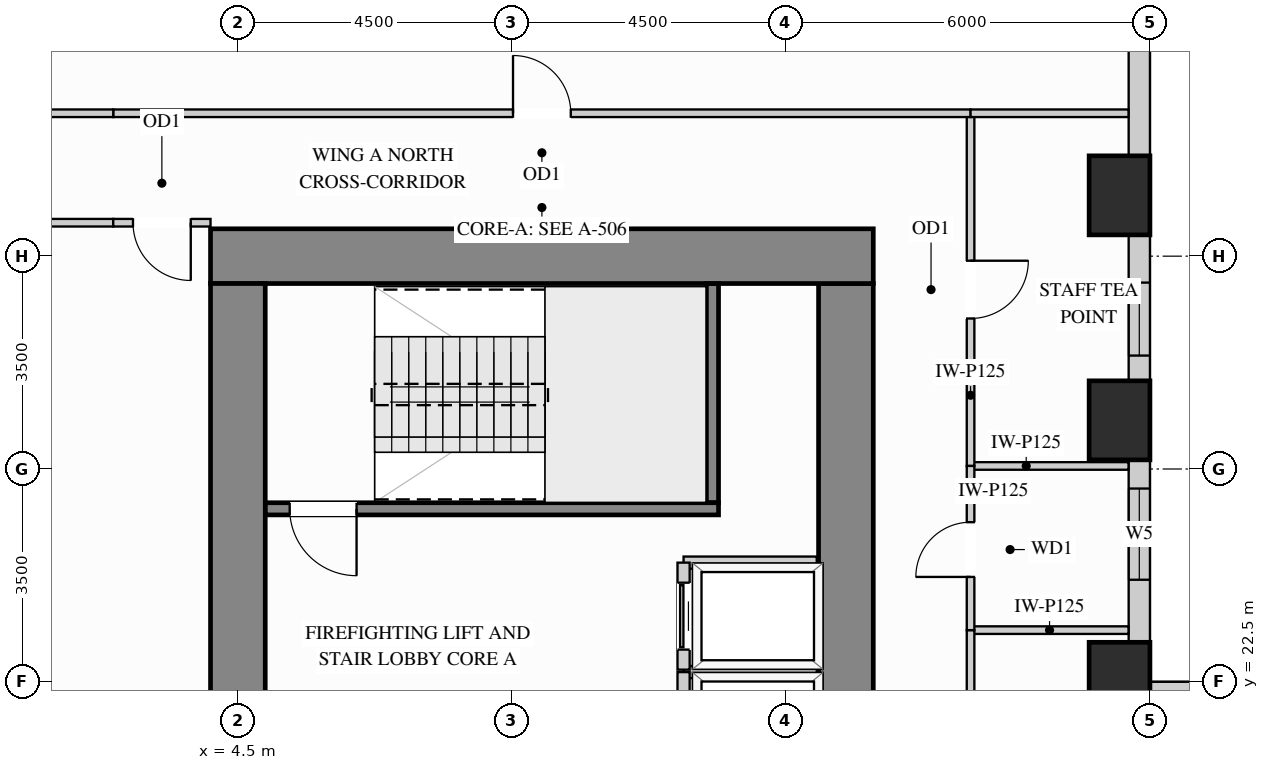
"""IFC4 building model, lengths in metres.
Left out: names, types, materials, properties, quantities, classifications, styles, units other than length and angle.
Written with IfcOpenShell. Run it as: python <this file> out.ifc"""

import sys

from ifc_helpers import new_model, si_unit, direction, frame, frame_2d, origin, origin_2d, place, context, subcontext, project, spatial, rectangle, extrude, source, transform, mapped, element, fill, save


model = new_model("IFC4")
c1 = context("Model", 3, precision=1e-05, world=origin(), true_north=direction((0.0, 1.0)))
c2 = subcontext(c1, "Body", "Model", "MODEL_VIEW")
j1 = project(units=[si_unit("LENGTHUNIT", "METRE"), si_unit("PLANEANGLEUNIT", "RADIAN")], contexts=[c1])
p1 = place(None, origin())
s1 = spatial("IfcSite", under=j1, at=p1, CompositionType="ELEMENT")
p2 = place(p1, origin())
s2 = spatial("IfcBuilding", under=s1, at=p2, CompositionType="ELEMENT")
p3 = place(p2, frame((0.0, 0.0, 29.7)))
s3 = spatial("IfcBuildingStorey", under=s2, at=p3, CompositionType="ELEMENT", Elevation=29.7)
m1 = source(origin(), c2, "Body", "SweptSolid", [
    extrude(rectangle(XDim=1.0, YDim=1.3, at=origin_2d()), origin(), (0.0, 0.0, 1.0), 3.38),
])
for number, where, z_axis, x_axis in (
    (1, (19.0, 22.5, 0.0), (0.0, 0.0, 1.0), (1.0, 0.0, 0.0)),
    (2, (19.0, 26.8, 0.0), (0.0, 0.0, 1.0), (1.0, 0.0, 0.0)),
    (3, (19.0, 30.5, 0.0), (0.0, 0.0, 1.0), (1.0, 0.0, 0.0)),
):
    element("IfcColumn", number, at=place(p3, frame(where, z_axis=z_axis, x_axis=x_axis)), inside=s3, PredefinedType="COLUMN", context=c2, shape_type="MappedRepresentation", body=[
        mapped(m1, transform((0.0, 0.0, 0.0), x_axis=(1.0, 0.0, 0.0), y_axis=(0.0, 1.0, 0.0), z_axis=(0.0, 0.0, 1.0))),
    ])
m2 = source(origin(), c2, "Body", "SweptSolid", [
    extrude(rectangle(XDim=8.17, YDim=0.9, at=frame_2d((4.085, 0.0))), origin(), (0.0, 0.0, 1.0), 3.38),
])
p4 = place(p3, frame((14.5, 20.88, 0.0), z_axis=(0.0, 0.0, 1.0), x_axis=(0.0, 1.0, 0.0)))
e4 = element("IfcWall", 4, at=p4, inside=s3, PredefinedType="SHEAR", context=c2, shape_type="MappedRepresentation", body=[
    mapped(m2, transform((0.0, 0.0, 0.0), x_axis=(1.0, 0.0, 0.0), y_axis=(0.0, 1.0, 0.0), z_axis=(0.0, 0.0, 1.0))),
])
m3 = source(origin(), c2, "Body", "SweptSolid", [
    extrude(rectangle(XDim=10.9, YDim=0.9, at=frame_2d((5.45, 0.0))), origin(), (0.0, 0.0, 1.0), 3.38),
])
p5 = place(p3, frame((4.05, 29.5, 0.0), z_axis=(0.0, 0.0, 1.0), x_axis=(1.0, 0.0, 0.0)))
e5 = element("IfcWall", 5, at=p5, inside=s3, PredefinedType="SHEAR", context=c2, shape_type="MappedRepresentation", body=[
    mapped(m3, transform((0.0, 0.0, 0.0), x_axis=(1.0, 0.0, 0.0), y_axis=(0.0, 1.0, 0.0), z_axis=(0.0, 0.0, 1.0))),
])
m4 = source(origin(), c2, "Body", "SweptSolid", [
    extrude(rectangle(XDim=20.1, YDim=0.9, at=frame_2d((10.05, 0.0))), origin(), (0.0, 0.0, 1.0), 3.38),
])
p6 = place(p3, frame((4.5, 8.95, 0.0), z_axis=(0.0, 0.0, 1.0), x_axis=(0.0, 1.0, 0.0)))
e6 = element("IfcWall", 6, at=p6, inside=s3, PredefinedType="SHEAR", context=c2, shape_type="MappedRepresentation", body=[
    mapped(m4, transform((0.0, 0.0, 0.0), x_axis=(1.0, 0.0, 0.0), y_axis=(0.0, 1.0, 0.0), z_axis=(0.0, 0.0, 1.0))),
])
p7 = place(p3, frame((34.352, 22.325, 0.0), z_axis=(0.0, 0.0, 1.0), x_axis=(-1.0, 0.0, 0.0)))
e7 = element("IfcWall", 7, at=p7, inside=s3, PredefinedType="SOLIDWALL", context=c2, shape_type="SweptSolid", body=[
    extrude(rectangle(XDim=14.854, YDim=0.35, at=frame_2d((7.427, 0.0))), origin(), (0.0, 0.0, 1.0), 3.365),
])
p8 = place(p7, frame((4.058, 0.0, 0.78)))
e8 = element("IfcOpeningElement", 8, at=p8, cuts=e7, PredefinedType="OPENING", context=c2, shape_type="SweptSolid", body=[
    extrude(rectangle(XDim=1.5, YDim=2.0, at=frame_2d((0.75, 1.0))), frame((0.0, 0.185, 0.0), z_axis=(0.0, -1.0, 0.0), x_axis=(1.0, 0.0, 0.0)), (0.0, 0.0, 1.0), 0.37),
])
p9 = place(p7, frame((9.296, 0.0, 0.78)))
e9 = element("IfcOpeningElement", 9, at=p9, cuts=e7, PredefinedType="OPENING", context=c2, shape_type="SweptSolid", body=[
    extrude(rectangle(XDim=1.5, YDim=2.0, at=frame_2d((0.75, 1.0))), frame((0.0, 0.185, 0.0), z_axis=(0.0, -1.0, 0.0), x_axis=(1.0, 0.0, 0.0)), (0.0, 0.0, 1.0), 0.37),
])
p10 = place(p3, frame((19.325, 23.148, 0.0), z_axis=(0.0, 0.0, 1.0), x_axis=(0.0, 1.0, 0.0)))
e10 = element("IfcWall", 10, at=p10, inside=s3, PredefinedType="SOLIDWALL", context=c2, shape_type="SweptSolid", body=[
    extrude(rectangle(XDim=3.004, YDim=0.35, at=frame_2d((1.502, 0.0))), origin(), (0.0, 0.0, 1.0), 2.51),
])
p11 = place(p10, frame((1.031, 0.0, 0.78)))
e11 = element("IfcOpeningElement", 11, at=p11, cuts=e10, PredefinedType="OPENING", context=c2, shape_type="SweptSolid", body=[
    extrude(rectangle(XDim=1.5, YDim=1.55, at=frame_2d((0.75, 0.775))), frame((0.0, 0.185, 0.0), z_axis=(0.0, -1.0, 0.0), x_axis=(1.0, 0.0, 0.0)), (0.0, 0.0, 1.0), 0.37),
])
p12 = place(p3, frame((19.325, 27.448, 0.0), z_axis=(0.0, 0.0, 1.0), x_axis=(0.0, 1.0, 0.0)))
e12 = element("IfcWall", 12, at=p12, inside=s3, PredefinedType="SOLIDWALL", context=c2, shape_type="SweptSolid", body=[
    extrude(rectangle(XDim=2.404, YDim=0.35, at=frame_2d((1.202, 0.0))), origin(), (0.0, 0.0, 1.0), 2.51),
])
p13 = place(p12, frame((0.417, 0.0, 0.78)))
e13 = element("IfcOpeningElement", 13, at=p13, cuts=e12, PredefinedType="OPENING", context=c2, shape_type="SweptSolid", body=[
    extrude(rectangle(XDim=1.2, YDim=1.55, at=frame_2d((0.6, 0.775))), frame((0.0, 0.185, 0.0), z_axis=(0.0, -1.0, 0.0), x_axis=(1.0, 0.0, 0.0)), (0.0, 0.0, 1.0), 0.37),
])
m5 = source(origin(), c2, "Body", "SweptSolid", [
    extrude(rectangle(XDim=3.204, YDim=0.35, at=frame_2d((1.602, 0.0))), origin(), (0.0, 0.0, 1.0), 2.51),
])
p14 = place(p3, frame((19.325, 31.148, 0.0), z_axis=(0.0, 0.0, 1.0), x_axis=(0.0, 1.0, 0.0)))
e14 = element("IfcWall", 14, at=p14, inside=s3, PredefinedType="SOLIDWALL", context=c2, shape_type="MappedRepresentation", body=[
    mapped(m5, transform((0.0, 0.0, 0.0), x_axis=(1.0, 0.0, 0.0), y_axis=(0.0, 1.0, 0.0), z_axis=(0.0, 0.0, 1.0))),
])
m6 = source(origin(), c2, "Body", "SweptSolid", [
    extrude(rectangle(XDim=2.598, YDim=0.125, at=frame_2d((1.299, 0.0))), origin(), (0.0, 0.0, 1.0), 3.365),
])
for number, where, z_axis, x_axis in (
    (15, (16.55, 23.35, 0.0), (0.0, 0.0, 1.0), (1.0, 0.0, 0.0)),
    (16, (16.55, 26.05, 0.0), (0.0, 0.0, 1.0), (1.0, 0.0, 0.0)),
):
    element("IfcWall", number, at=place(p3, frame(where, z_axis=z_axis, x_axis=x_axis)), inside=s3, PredefinedType="PARTITIONING", context=c2, shape_type="MappedRepresentation", body=[
        mapped(m6, transform((0.0, 0.0, 0.0), x_axis=(1.0, 0.0, 0.0), y_axis=(0.0, 1.0, 0.0), z_axis=(0.0, 0.0, 1.0))),
    ])
p15 = place(p3, frame((16.55, 15.6, 0.0), z_axis=(0.0, 0.0, 1.0), x_axis=(0.0, 1.0, 0.0)))
e17 = element("IfcWall", 17, at=p15, inside=s3, PredefinedType="PARTITIONING", context=c2, shape_type="SweptSolid", body=[
    extrude(rectangle(XDim=7.75, YDim=0.125, at=frame_2d((3.875, 0.0))), origin(), (0.0, 0.0, 1.0), 3.365),
])
p16 = place(p15, frame((3.4, 0.0, 0.0)))
e18 = element("IfcOpeningElement", 18, at=p16, cuts=e17, PredefinedType="OPENING", context=c2, shape_type="SweptSolid", body=[
    extrude(rectangle(XDim=0.95, YDim=2.15, at=frame_2d((0.475, 1.075))), frame((0.0, 0.073, 0.0), z_axis=(0.0, -1.0, 0.0), x_axis=(1.0, 0.0, 0.0)), (0.0, 0.0, 1.0), 0.145),
])
p17 = place(p3, frame((16.55, 26.05, 0.0), z_axis=(0.0, 0.0, 1.0), x_axis=(0.0, 1.0, 0.0)))
e19 = element("IfcWall", 19, at=p17, inside=s3, PredefinedType="PARTITIONING", context=c2, shape_type="SweptSolid", body=[
    extrude(rectangle(XDim=5.8, YDim=0.125, at=frame_2d((2.9, 0.0))), origin(), (0.0, 0.0, 1.0), 3.365),
])
p18 = place(p17, frame((2.425, 0.0, 0.0)))
e20 = element("IfcOpeningElement", 20, at=p18, cuts=e19, PredefinedType="OPENING", context=c2, shape_type="SweptSolid", body=[
    extrude(rectangle(XDim=0.95, YDim=2.15, at=frame_2d((0.475, 1.075))), frame((0.0, 0.073, 0.0), z_axis=(0.0, -1.0, 0.0), x_axis=(1.0, 0.0, 0.0)), (0.0, 0.0, 1.0), 0.145),
])
p19 = place(p3, frame((16.55, 23.35, 0.0), z_axis=(0.0, 0.0, 1.0), x_axis=(0.0, 1.0, 0.0)))
e21 = element("IfcWall", 21, at=p19, inside=s3, PredefinedType="PARTITIONING", context=c2, shape_type="SweptSolid", body=[
    extrude(rectangle(XDim=2.7, YDim=0.125, at=frame_2d((1.35, 0.0))), origin(), (0.0, 0.0, 1.0), 3.365),
])
p20 = place(p19, frame((0.875, 0.0, 0.0)))
e22 = element("IfcOpeningElement", 22, at=p20, cuts=e21, PredefinedType="OPENING", context=c2, shape_type="SweptSolid", body=[
    extrude(rectangle(XDim=0.9, YDim=2.15, at=frame_2d((0.45, 1.075))), frame((0.0, 0.073, 0.0), z_axis=(0.0, -1.0, 0.0), x_axis=(1.0, 0.0, 0.0)), (0.0, 0.0, 1.0), 0.145),
])
p21 = place(p3, frame((2.45, 31.85, 0.0), z_axis=(0.0, 0.0, 1.0), x_axis=(1.0, 0.0, 0.0)))
e23 = element("IfcWall", 23, at=p21, inside=s3, PredefinedType="PARTITIONING", context=c2, shape_type="SweptSolid", body=[
    extrude(rectangle(XDim=14.1, YDim=0.125, at=frame_2d((7.05, 0.0))), origin(), (0.0, 0.0, 1.0), 2.828),
])
p22 = place(p21, frame((6.575, 0.0, 0.0)))
e24 = element("IfcOpeningElement", 24, at=p22, cuts=e23, PredefinedType="OPENING", context=c2, shape_type="SweptSolid", body=[
    extrude(rectangle(XDim=0.95, YDim=2.15, at=frame_2d((0.475, 1.075))), frame((0.0, 0.073, 0.0), z_axis=(0.0, -1.0, 0.0), x_axis=(1.0, 0.0, 0.0)), (0.0, 0.0, 1.0), 0.145),
])
m7 = source(origin(), c2, "Body", "SweptSolid", [
    extrude(rectangle(XDim=2.598, YDim=0.125, at=frame_2d((1.299, 0.0))), origin(), (0.0, 0.0, 1.0), 2.828),
])
p23 = place(p3, frame((16.55, 31.85, 0.0), z_axis=(0.0, 0.0, 1.0), x_axis=(1.0, 0.0, 0.0)))
e25 = element("IfcWall", 25, at=p23, inside=s3, PredefinedType="PARTITIONING", context=c2, shape_type="MappedRepresentation", body=[
    mapped(m7, transform((0.0, 0.0, 0.0), x_axis=(1.0, 0.0, 0.0), y_axis=(0.0, 1.0, 0.0), z_axis=(0.0, 0.0, 1.0))),
])
m8 = source(origin(), c2, "Body", "SweptSolid", [
    extrude(rectangle(XDim=2.098, YDim=0.125, at=frame_2d((1.049, 0.0))), origin(), (0.0, 0.0, 1.0), 2.828),
])
p24 = place(p3, frame((0.352, 31.85, 0.0), z_axis=(0.0, 0.0, 1.0), x_axis=(1.0, 0.0, 0.0)))
e26 = element("IfcWall", 26, at=p24, inside=s3, PredefinedType="PARTITIONING", context=c2, shape_type="MappedRepresentation", body=[
    mapped(m8, transform((0.0, 0.0, 0.0), x_axis=(1.0, 0.0, 0.0), y_axis=(0.0, 1.0, 0.0), z_axis=(0.0, 0.0, 1.0))),
])
m9 = source(origin(), c2, "Body", "SweptSolid", [
    extrude(rectangle(XDim=1.19, YDim=0.125, at=frame_2d((0.595, 0.0))), origin(), (0.0, 0.0, 1.0), 3.365),
])
p25 = place(p3, frame((1.26, 30.05, 0.0), z_axis=(0.0, 0.0, 1.0), x_axis=(1.0, 0.0, 0.0)))
e27 = element("IfcWall", 27, at=p25, inside=s3, PredefinedType="PARTITIONING", context=c2, shape_type="MappedRepresentation", body=[
    mapped(m9, transform((0.0, 0.0, 0.0), x_axis=(1.0, 0.0, 0.0), y_axis=(0.0, 1.0, 0.0), z_axis=(0.0, 0.0, 1.0))),
])
p26 = place(p3, frame((2.45, 30.05, 0.0), z_axis=(0.0, 0.0, 1.0), x_axis=(1.0, 0.0, 0.0)))
e28 = element("IfcWall", 28, at=p26, inside=s3, PredefinedType="PARTITIONING", context=c2, shape_type="SweptSolid", body=[
    extrude(rectangle(XDim=1.6, YDim=0.125, at=frame_2d((0.8, 0.0))), origin(), (0.0, 0.0, 1.0), 3.365),
])
p27 = place(p26, frame((0.325, 0.0, 0.0)))
e29 = element("IfcOpeningElement", 29, at=p27, cuts=e28, PredefinedType="OPENING", context=c2, shape_type="SweptSolid", body=[
    extrude(rectangle(XDim=0.95, YDim=2.15, at=frame_2d((0.475, 1.075))), frame((0.0, 0.073, 0.0), z_axis=(0.0, -1.0, 0.0), x_axis=(1.0, 0.0, 0.0)), (0.0, 0.0, 1.0), 0.145),
])
m10 = source(origin(), c2, "Body", "SweptSolid", [
    extrude(rectangle(XDim=2.19, YDim=0.2, at=frame_2d((1.095, 0.0))), origin(), (0.0, 0.0, 1.0), 3.365),
])
p28 = place(p3, frame((11.83, 22.66, 0.0), z_axis=(0.0, 0.0, 1.0), x_axis=(1.0, 0.0, 0.0)))
e30 = element("IfcWall", 30, at=p28, inside=s3, PredefinedType="PARTITIONING", context=c2, shape_type="MappedRepresentation", body=[
    mapped(m10, transform((0.0, 0.0, 0.0), x_axis=(1.0, 0.0, 0.0), y_axis=(0.0, 1.0, 0.0), z_axis=(0.0, 0.0, 1.0))),
])
p29 = place(p3, frame((11.83, 20.9, 0.0), z_axis=(0.0, 0.0, 1.0), x_axis=(0.0, 1.0, 0.0)))
e31 = element("IfcWall", 31, at=p29, inside=s3, PredefinedType="PARTITIONING", context=c2, shape_type="SweptSolid", body=[
    extrude(rectangle(XDim=1.76, YDim=0.2, at=frame_2d((0.88, 0.0))), origin(), (0.0, 0.0, 1.0), 3.365),
])
p30 = place(p29, frame((0.33, 0.0, 0.0)))
e32 = element("IfcOpeningElement", 32, at=p30, cuts=e31, PredefinedType="OPENING", context=c2, shape_type="SweptSolid", body=[
    extrude(rectangle(XDim=1.1, YDim=2.2, at=frame_2d((0.55, 1.1))), frame((0.0, 0.11, 0.0), z_axis=(0.0, -1.0, 0.0), x_axis=(1.0, 0.0, 0.0)), (0.0, 0.0, 1.0), 0.22),
])
p31 = place(p3, frame((11.83, 24.46, 0.0), z_axis=(0.0, 0.0, 1.0), x_axis=(1.0, 0.0, 0.0)))
e33 = element("IfcWall", 33, at=p31, inside=s3, PredefinedType="PARTITIONING", context=c2, shape_type="MappedRepresentation", body=[
    mapped(m10, transform((0.0, 0.0, 0.0), x_axis=(1.0, 0.0, 0.0), y_axis=(0.0, 1.0, 0.0), z_axis=(0.0, 0.0, 1.0))),
])
p32 = place(p3, frame((11.83, 22.7, 0.0), z_axis=(0.0, 0.0, 1.0), x_axis=(0.0, 1.0, 0.0)))
e34 = element("IfcWall", 34, at=p32, inside=s3, PredefinedType="PARTITIONING", context=c2, shape_type="SweptSolid", body=[
    extrude(rectangle(XDim=1.76, YDim=0.2, at=frame_2d((0.88, 0.0))), origin(), (0.0, 0.0, 1.0), 3.365),
])
p33 = place(p32, frame((0.33, 0.0, 0.0)))
e35 = element("IfcOpeningElement", 35, at=p33, cuts=e34, PredefinedType="OPENING", context=c2, shape_type="SweptSolid", body=[
    extrude(rectangle(XDim=1.1, YDim=2.2, at=frame_2d((0.55, 1.1))), frame((0.0, 0.11, 0.0), z_axis=(0.0, -1.0, 0.0), x_axis=(1.0, 0.0, 0.0)), (0.0, 0.0, 1.0), 0.22),
])
m11 = source(origin(), c2, "Body", "SweptSolid", [
    extrude(rectangle(XDim=3.603, YDim=0.2, at=frame_2d((1.802, 0.0))), origin(), (0.0, 0.0, 1.0), 3.38),
])
p34 = place(p3, frame((12.305, 25.445, 0.0), z_axis=(0.0, 0.0, 1.0), x_axis=(0.0, 1.0, 0.0)))
e36 = element("IfcWall", 36, at=p34, inside=s3, PredefinedType="SHEAR", context=c2, shape_type="MappedRepresentation", body=[
    mapped(m11, transform((0.0, 0.0, 0.0), x_axis=(1.0, 0.0, 0.0), y_axis=(0.0, 1.0, 0.0), z_axis=(0.0, 0.0, 1.0))),
])
p35 = place(p3, frame((4.952, 25.345, 0.0), z_axis=(0.0, 0.0, 1.0), x_axis=(1.0, 0.0, 0.0)))
e37 = element("IfcWall", 37, at=p35, inside=s3, PredefinedType="SHEAR", context=c2, shape_type="SweptSolid", body=[
    extrude(rectangle(XDim=7.453, YDim=0.2, at=frame_2d((3.727, 0.0))), origin(), (0.0, 0.0, 1.0), 3.38),
])
p36 = place(p35, frame((0.4, 0.0, 0.0)))
e38 = element("IfcOpeningElement", 38, at=p36, cuts=e37, PredefinedType="OPENING", context=c2, shape_type="SweptSolid", body=[
    extrude(rectangle(XDim=1.1, YDim=2.15, at=frame_2d((0.55, 1.075))), frame((0.0, 0.11, 0.0), z_axis=(0.0, -1.0, 0.0), x_axis=(1.0, 0.0, 0.0)), (0.0, 0.0, 1.0), 0.22),
])
m12 = source(origin(), c2, "Body", "SweptSolid", [
    extrude(rectangle(XDim=1.1, YDim=2.2, at=frame_2d((0.55, 1.1))), frame((0.0, 0.025, 0.0), z_axis=(0.0, -1.0, 0.0), x_axis=(1.0, 0.0, 0.0)), (0.0, 0.0, 1.0), 0.05),
])
p37 = place(p33, origin())
e39 = element("IfcDoor", 39, at=p37, inside=s3, OperationType="SLIDING_TO_LEFT", PredefinedType="DOOR", context=c2, shape_type="MappedRepresentation", body=[
    mapped(m12, transform((0.0, 0.0, 0.0), x_axis=(1.0, 0.0, 0.0), y_axis=(0.0, 1.0, 0.0), z_axis=(0.0, 0.0, 1.0))),
])
fill(e35, e39)
m13 = source(origin(), c2, "Body", "SweptSolid", [
    extrude(rectangle(XDim=0.95, YDim=2.15, at=frame_2d((0.475, 1.075))), frame((0.0, 0.025, 0.0), z_axis=(0.0, -1.0, 0.0), x_axis=(1.0, 0.0, 0.0)), (0.0, 0.0, 1.0), 0.05),
])
p38 = place(p18, origin())
e40 = element("IfcDoor", 40, at=p38, inside=s3, OperationType="SINGLE_SWING_RIGHT", PredefinedType="DOOR", context=c2, shape_type="MappedRepresentation", body=[
    mapped(m13, transform((0.0, 0.0, 0.0), x_axis=(1.0, 0.0, 0.0), y_axis=(0.0, 1.0, 0.0), z_axis=(0.0, 0.0, 1.0))),
])
fill(e20, e40)
p39 = place(p22, origin())
e41 = element("IfcDoor", 41, at=p39, inside=s3, OperationType="SINGLE_SWING_LEFT", PredefinedType="DOOR", context=c2, shape_type="MappedRepresentation", body=[
    mapped(m13, transform((0.0, 0.0, 0.0), x_axis=(1.0, 0.0, 0.0), y_axis=(0.0, 1.0, 0.0), z_axis=(0.0, 0.0, 1.0))),
])
fill(e24, e41)
p40 = place(p27, origin())
e42 = element("IfcDoor", 42, at=p40, inside=s3, OperationType="SINGLE_SWING_RIGHT", PredefinedType="DOOR", context=c2, shape_type="MappedRepresentation", body=[
    mapped(m13, transform((0.0, 0.0, 0.0), x_axis=(1.0, 0.0, 0.0), y_axis=(0.0, 1.0, 0.0), z_axis=(0.0, 0.0, 1.0))),
])
fill(e29, e42)
m14 = source(origin(), c2, "Body", "SweptSolid", [
    extrude(rectangle(XDim=1.1, YDim=2.15, at=frame_2d((0.55, 1.075))), frame((0.0, 0.025, 0.0), z_axis=(0.0, -1.0, 0.0), x_axis=(1.0, 0.0, 0.0)), (0.0, 0.0, 1.0), 0.05),
])
p41 = place(p36, origin())
e43 = element("IfcDoor", 43, at=p41, inside=s3, OperationType="SINGLE_SWING_RIGHT", PredefinedType="DOOR", context=c2, shape_type="MappedRepresentation", body=[
    mapped(m14, transform((0.0, 0.0, 0.0), x_axis=(1.0, 0.0, 0.0), y_axis=(0.0, 1.0, 0.0), z_axis=(0.0, 0.0, 1.0))),
])
fill(e38, e43)
m15 = source(origin(), c2, "Body", "SweptSolid", [
    extrude(rectangle(XDim=0.9, YDim=2.15, at=frame_2d((0.45, 1.075))), frame((0.0, 0.025, 0.0), z_axis=(0.0, -1.0, 0.0), x_axis=(1.0, 0.0, 0.0)), (0.0, 0.0, 1.0), 0.05),
])
p42 = place(p20, origin())
e44 = element("IfcDoor", 44, at=p42, inside=s3, OperationType="SINGLE_SWING_LEFT", PredefinedType="DOOR", context=c2, shape_type="MappedRepresentation", body=[
    mapped(m15, transform((0.0, 0.0, 0.0), x_axis=(1.0, 0.0, 0.0), y_axis=(0.0, 1.0, 0.0), z_axis=(0.0, 0.0, 1.0))),
])
fill(e22, e44)
m16 = source(origin(), c2, "Body", "SweptSolid", [
    extrude(rectangle(XDim=1.2, YDim=1.55, at=frame_2d((0.6, 0.775))), frame((0.0, 0.03, 0.0), z_axis=(0.0, -1.0, 0.0), x_axis=(1.0, 0.0, 0.0)), (0.0, 0.0, 1.0), 0.06),
])
p43 = place(p13, origin())
e45 = element("IfcWindow", 45, at=p43, inside=s3, PartitioningType="SINGLE_PANEL", PredefinedType="WINDOW", context=c2, shape_type="MappedRepresentation", body=[
    mapped(m16, transform((0.0, 0.0, 0.0), x_axis=(1.0, 0.0, 0.0), y_axis=(0.0, 1.0, 0.0), z_axis=(0.0, 0.0, 1.0))),
])
fill(e13, e45)
m17 = source(origin(), c2, "Body", "SweptSolid", [
    extrude(rectangle(XDim=1.5, YDim=1.55, at=frame_2d((0.75, 0.775))), frame((0.0, 0.03, 0.0), z_axis=(0.0, -1.0, 0.0), x_axis=(1.0, 0.0, 0.0)), (0.0, 0.0, 1.0), 0.06),
])
p44 = place(p11, origin())
e46 = element("IfcWindow", 46, at=p44, inside=s3, PartitioningType="SINGLE_PANEL", PredefinedType="WINDOW", context=c2, shape_type="MappedRepresentation", body=[
    mapped(m17, transform((0.0, 0.0, 0.0), x_axis=(1.0, 0.0, 0.0), y_axis=(0.0, 1.0, 0.0), z_axis=(0.0, 0.0, 1.0))),
])
fill(e11, e46)
save(model, sys.argv[1])
